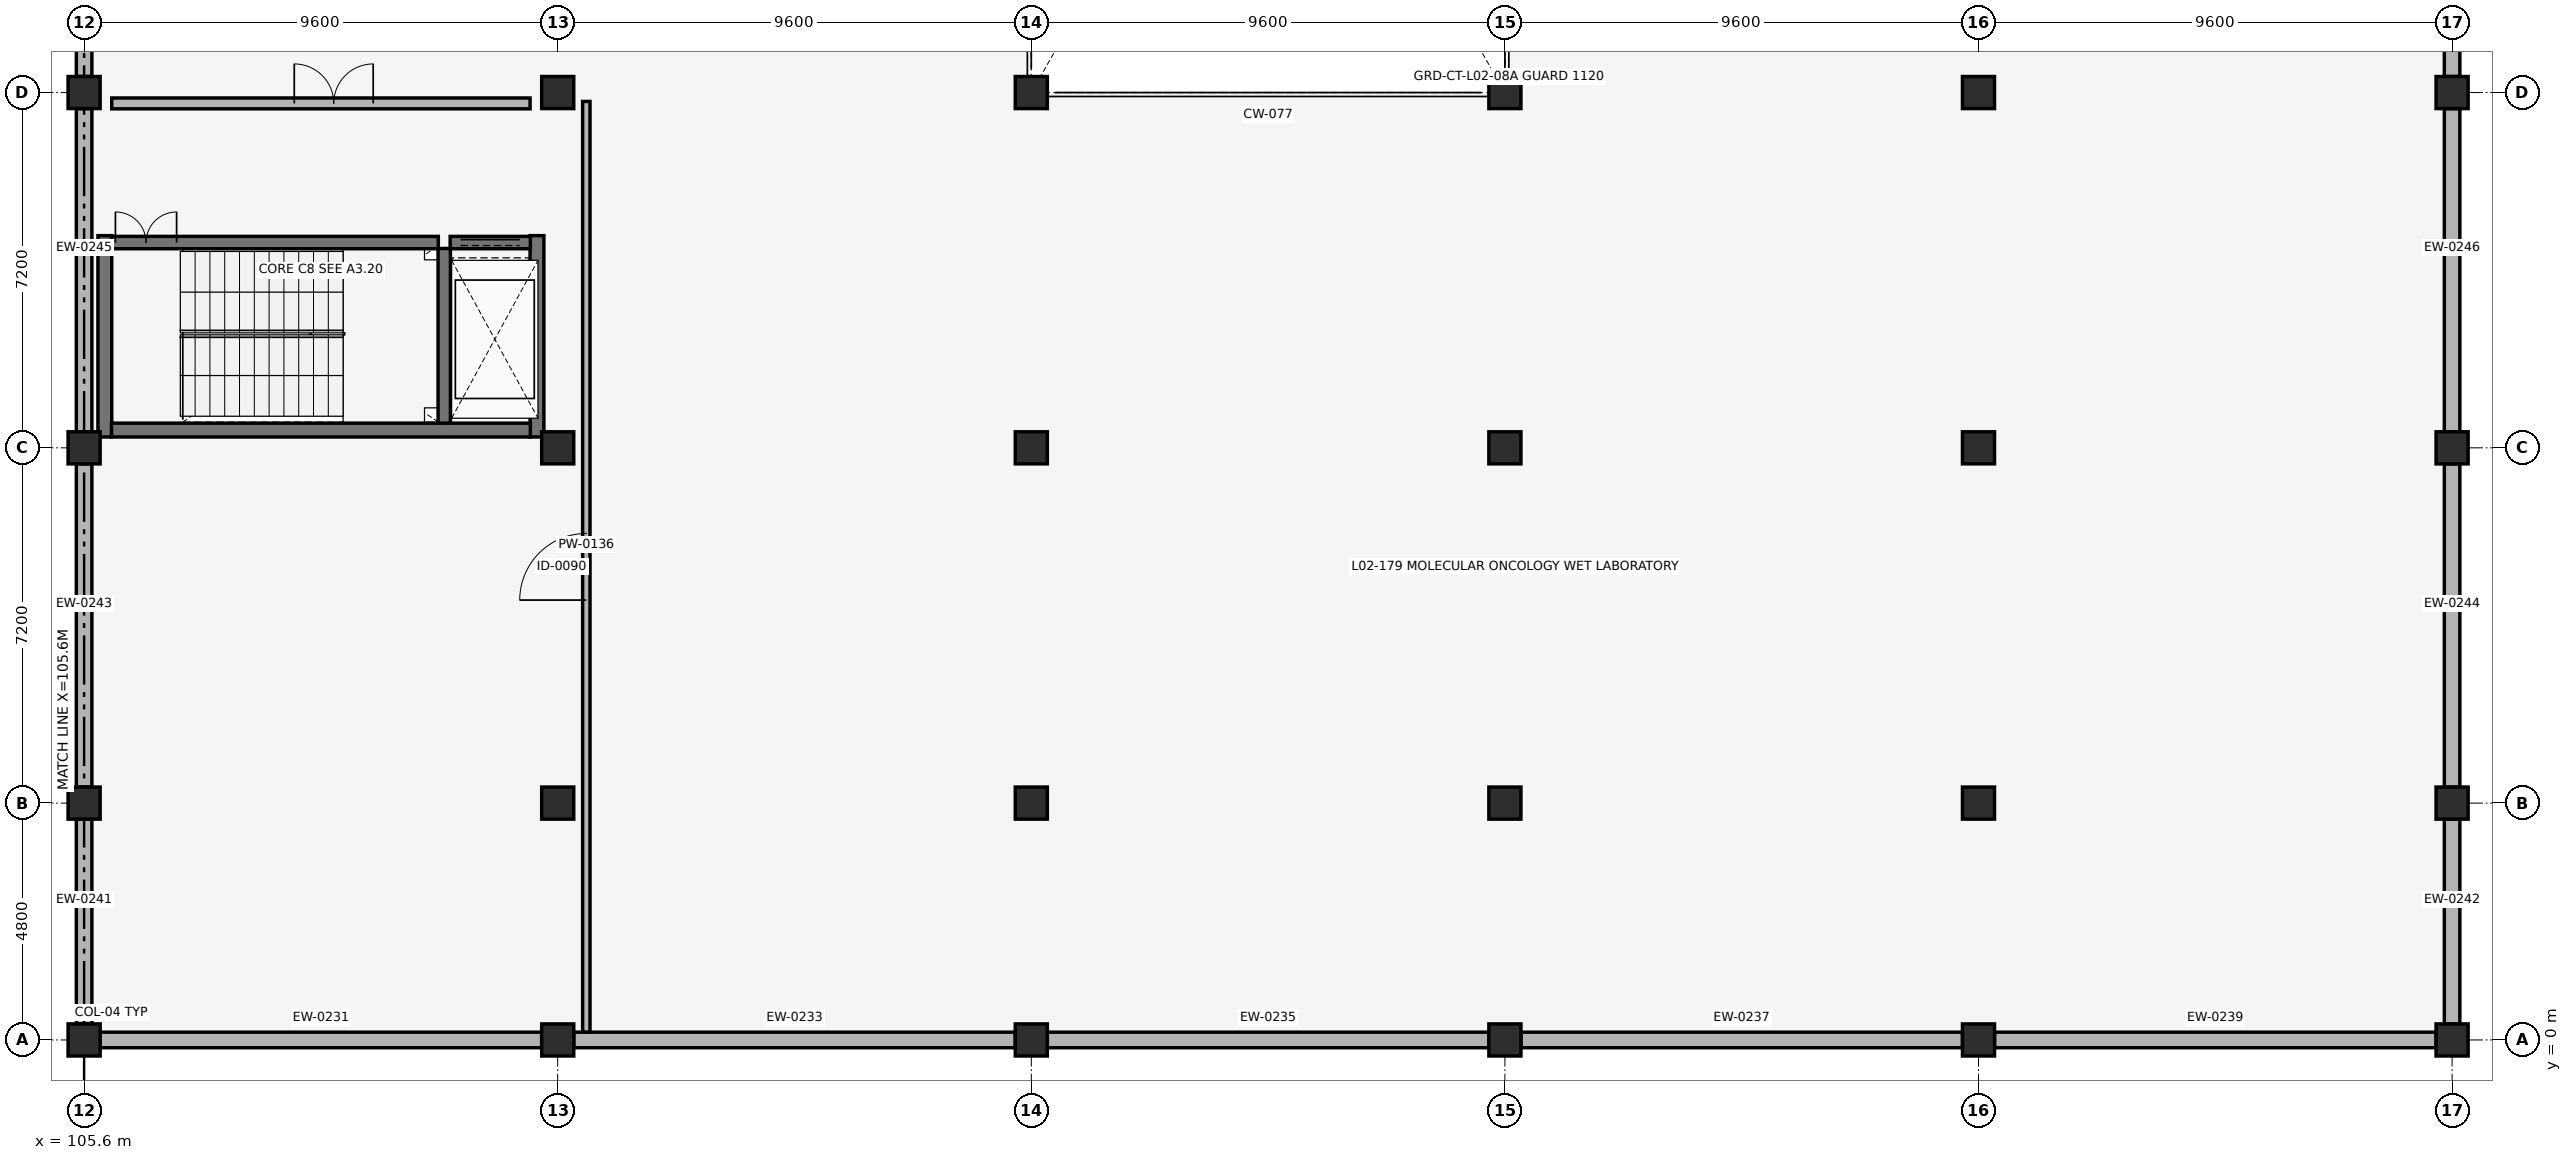
"""IFC4 building model, lengths in metres.
Left out: names, types, materials, properties, quantities, classifications, styles, units other than length and angle.
Written with IfcOpenShell. Run it as: python <this file> out.ifc"""

import sys

from ifc_helpers import new_model, si_unit, direction, frame, frame_2d, origin, origin_2d, place, context, subcontext, project, spatial, rectangle, extrude, element, fill, save


model = new_model("IFC4")
c1 = context("Model", 3, precision=1e-05, world=origin(), true_north=direction((0.0, 1.0)))
c2 = subcontext(c1, "Body", "Model", "MODEL_VIEW")
j1 = project(units=[si_unit("LENGTHUNIT", "METRE"), si_unit("PLANEANGLEUNIT", "RADIAN")], contexts=[c1])
p1 = place(None, origin())
s1 = spatial("IfcSite", under=j1, at=p1, CompositionType="ELEMENT")
p2 = place(p1, origin())
s2 = spatial("IfcBuilding", under=s1, at=p2, CompositionType="ELEMENT")
p3 = place(p2, frame((0.0, 0.0, 8.5)))
s3 = spatial("IfcBuildingStorey", under=s2, at=p3, CompositionType="ELEMENT", Elevation=8.5)
for number, where, z_axis, x_axis in (
    (1, (105.6, 0.0, 0.0), (0.0, 0.0, 1.0), (1.0, 0.0, 0.0)),
    (2, (105.6, 4.8, 0.0), (0.0, 0.0, 1.0), (1.0, 0.0, 0.0)),
    (3, (105.6, 12.0, 0.0), (0.0, 0.0, 1.0), (1.0, 0.0, 0.0)),
    (4, (105.6, 19.2, 0.0), (0.0, 0.0, 1.0), (1.0, 0.0, 0.0)),
    (5, (115.2, 0.0, 0.0), (0.0, 0.0, 1.0), (1.0, 0.0, 0.0)),
    (6, (115.2, 4.8, 0.0), (0.0, 0.0, 1.0), (1.0, 0.0, 0.0)),
    (7, (115.2, 12.0, 0.0), (0.0, 0.0, 1.0), (1.0, 0.0, 0.0)),
    (8, (115.2, 19.2, 0.0), (0.0, 0.0, 1.0), (1.0, 0.0, 0.0)),
    (9, (124.8, 0.0, 0.0), (0.0, 0.0, 1.0), (1.0, 0.0, 0.0)),
    (10, (124.8, 4.8, 0.0), (0.0, 0.0, 1.0), (1.0, 0.0, 0.0)),
    (11, (124.8, 12.0, 0.0), (0.0, 0.0, 1.0), (1.0, 0.0, 0.0)),
    (12, (124.8, 19.2, 0.0), (0.0, 0.0, 1.0), (1.0, 0.0, 0.0)),
    (13, (134.4, 0.0, 0.0), (0.0, 0.0, 1.0), (1.0, 0.0, 0.0)),
    (14, (134.4, 4.8, 0.0), (0.0, 0.0, 1.0), (1.0, 0.0, 0.0)),
    (15, (134.4, 12.0, 0.0), (0.0, 0.0, 1.0), (1.0, 0.0, 0.0)),
    (16, (134.4, 19.2, 0.0), (0.0, 0.0, 1.0), (1.0, 0.0, 0.0)),
    (17, (144.0, 0.0, 0.0), (0.0, 0.0, 1.0), (1.0, 0.0, 0.0)),
    (18, (144.0, 4.8, 0.0), (0.0, 0.0, 1.0), (1.0, 0.0, 0.0)),
    (19, (144.0, 12.0, 0.0), (0.0, 0.0, 1.0), (1.0, 0.0, 0.0)),
    (20, (144.0, 19.2, 0.0), (0.0, 0.0, 1.0), (1.0, 0.0, 0.0)),
    (21, (153.6, 0.0, 0.0), (0.0, 0.0, 1.0), (1.0, 0.0, 0.0)),
    (22, (153.6, 4.8, 0.0), (0.0, 0.0, 1.0), (1.0, 0.0, 0.0)),
    (23, (153.6, 12.0, 0.0), (0.0, 0.0, 1.0), (1.0, 0.0, 0.0)),
    (24, (153.6, 19.2, 0.0), (0.0, 0.0, 1.0), (1.0, 0.0, 0.0)),
):
    element("IfcColumn", number, at=place(p3, frame(where, z_axis=z_axis, x_axis=x_axis)), inside=s3, PredefinedType="COLUMN", context=c2, shape_type="SweptSolid", body=[
        extrude(rectangle(XDim=0.65, YDim=0.65, at=origin_2d()), origin(), (0.0, 0.0, 1.0), 4.08),
    ])
p4 = place(p3, frame((105.925, 0.0, 0.0), z_axis=(0.0, 0.0, 1.0), x_axis=(1.0, 0.0, 0.0)))
e25 = element("IfcWall", 25, at=p4, inside=s3, PredefinedType="SOLIDWALL", context=c2, shape_type="SweptSolid", body=[
    extrude(rectangle(XDim=8.95, YDim=0.315, at=frame_2d((4.475, 0.0))), origin(), (0.0, 0.0, 1.0), 3.06),
])
p5 = place(p3, frame((115.525, 0.0, 0.0), z_axis=(0.0, 0.0, 1.0), x_axis=(1.0, 0.0, 0.0)))
e26 = element("IfcWall", 26, at=p5, inside=s3, PredefinedType="SOLIDWALL", context=c2, shape_type="SweptSolid", body=[
    extrude(rectangle(XDim=8.95, YDim=0.315, at=frame_2d((4.475, 0.0))), origin(), (0.0, 0.0, 1.0), 3.06),
])
for number, where, z_axis, x_axis in (
    (27, (125.125, 0.0, 0.0), (0.0, 0.0, 1.0), (1.0, 0.0, 0.0)),
    (28, (134.725, 0.0, 0.0), (0.0, 0.0, 1.0), (1.0, 0.0, 0.0)),
    (29, (144.325, 0.0, 0.0), (0.0, 0.0, 1.0), (1.0, 0.0, 0.0)),
):
    element("IfcWall", number, at=place(p3, frame(where, z_axis=z_axis, x_axis=x_axis)), inside=s3, PredefinedType="SOLIDWALL", context=c2, shape_type="SweptSolid", body=[
        extrude(rectangle(XDim=8.95, YDim=0.315, at=frame_2d((4.475, 0.0))), origin(), (0.0, 0.0, 1.0), 3.06),
    ])
for number, where, z_axis, x_axis in (
    (30, (105.6, 4.475, 0.0), (0.0, 0.0, 1.0), (0.0, -1.0, 0.0)),
    (31, (153.6, 0.325, 0.0), (0.0, 0.0, 1.0), (0.0, 1.0, 0.0)),
):
    element("IfcWall", number, at=place(p3, frame(where, z_axis=z_axis, x_axis=x_axis)), inside=s3, PredefinedType="SOLIDWALL", context=c2, shape_type="SweptSolid", body=[
        extrude(rectangle(XDim=4.15, YDim=0.315, at=frame_2d((2.075, 0.0))), origin(), (0.0, 0.0, 1.0), 3.06),
    ])
for number, where, z_axis, x_axis in (
    (32, (105.6, 11.675, 0.0), (0.0, 0.0, 1.0), (0.0, -1.0, 0.0)),
    (33, (153.6, 5.125, 0.0), (0.0, 0.0, 1.0), (0.0, 1.0, 0.0)),
    (34, (105.6, 18.875, 0.0), (0.0, 0.0, 1.0), (0.0, -1.0, 0.0)),
    (35, (153.6, 12.325, 0.0), (0.0, 0.0, 1.0), (0.0, 1.0, 0.0)),
    (36, (105.6, 26.075, 0.0), (0.0, 0.0, 1.0), (0.0, -1.0, 0.0)),
    (37, (153.6, 19.525, 0.0), (0.0, 0.0, 1.0), (0.0, 1.0, 0.0)),
):
    element("IfcWall", number, at=place(p3, frame(where, z_axis=z_axis, x_axis=x_axis)), inside=s3, PredefinedType="SOLIDWALL", context=c2, shape_type="SweptSolid", body=[
        extrude(rectangle(XDim=6.55, YDim=0.315, at=frame_2d((3.275, 0.0))), origin(), (0.0, 0.0, 1.0), 3.06),
    ])
for number, where, z_axis, x_axis in (
    (38, (106.02, 12.22, 0.0), (0.0, 0.0, 1.0), (0.0, 1.0, 0.0)),
    (39, (114.78, 12.22, 0.0), (0.0, 0.0, 1.0), (0.0, 1.0, 0.0)),
):
    element("IfcWall", number, at=place(p3, frame(where, z_axis=z_axis, x_axis=x_axis)), inside=s3, PredefinedType="SHEAR", context=c2, shape_type="SweptSolid", body=[
        extrude(rectangle(XDim=4.08, YDim=0.28, at=frame_2d((2.04, 0.0))), origin(), (0.0, 0.0, 1.0), 3.78),
    ])
p6 = place(p3, frame((106.155, 12.36, 0.0), z_axis=(0.0, 0.0, 1.0), x_axis=(1.0, 0.0, 0.0)))
e40 = element("IfcWall", 40, at=p6, inside=s3, PredefinedType="SHEAR", context=c2, shape_type="SweptSolid", body=[
    extrude(rectangle(XDim=8.49, YDim=0.28, at=frame_2d((4.245, 0.0))), origin(), (0.0, 0.0, 1.0), 3.78),
])
p7 = place(p3, frame((112.9, 12.5, 0.0), z_axis=(0.0, 0.0, 1.0), x_axis=(0.0, 1.0, 0.0)))
e41 = element("IfcWall", 41, at=p7, inside=s3, PredefinedType="SHEAR", context=c2, shape_type="SweptSolid", body=[
    extrude(rectangle(XDim=3.54, YDim=0.25, at=frame_2d((1.77, 0.0))), origin(), (0.0, 0.0, 1.0), 3.78),
])
p8 = place(p3, frame((106.155, 16.16, 0.0), z_axis=(0.0, 0.0, 1.0), x_axis=(1.0, 0.0, 0.0)))
e42 = element("IfcWall", 42, at=p8, inside=s3, PredefinedType="SHEAR", context=c2, shape_type="SweptSolid", body=[
    extrude(rectangle(XDim=6.625, YDim=0.25, at=frame_2d((3.312, 0.0))), origin(), (0.0, 0.0, 1.0), 3.78),
])
p9 = place(p8, frame((0.08, 0.0, 0.0)))
e43 = element("IfcOpeningElement", 43, at=p9, cuts=e42, PredefinedType="OPENING", context=c2, shape_type="SweptSolid", body=[
    extrude(rectangle(XDim=1.24, YDim=2.15, at=frame_2d((0.62, 1.075))), frame((0.0, 0.135, 0.0), z_axis=(0.0, -1.0, 0.0), x_axis=(1.0, 0.0, 0.0)), (0.0, 0.0, 1.0), 0.27),
])
p10 = place(p3, frame((106.16, 18.98, 0.0), z_axis=(0.0, 0.0, 1.0), x_axis=(1.0, 0.0, 0.0)))
e44 = element("IfcWall", 44, at=p10, inside=s3, PredefinedType="PARTITIONING", context=c2, shape_type="SweptSolid", body=[
    extrude(rectangle(XDim=8.48, YDim=0.22, at=frame_2d((4.24, 0.0))), origin(), (0.0, 0.0, 1.0), 3.06),
])
p11 = place(p10, frame((3.7, 0.0, 0.0)))
e45 = element("IfcOpeningElement", 45, at=p11, cuts=e44, PredefinedType="OPENING", context=c2, shape_type="SweptSolid", body=[
    extrude(rectangle(XDim=1.6, YDim=2.2, at=frame_2d((0.8, 1.1))), frame((0.0, 0.12, 0.0), z_axis=(0.0, -1.0, 0.0), x_axis=(1.0, 0.0, 0.0)), (0.0, 0.0, 1.0), 0.24),
])
p12 = place(p3, frame((113.02, 16.16, 0.0), z_axis=(0.0, 0.0, 1.0), x_axis=(1.0, 0.0, 0.0)))
e46 = element("IfcWall", 46, at=p12, inside=s3, PredefinedType="SHEAR", context=c2, shape_type="SweptSolid", body=[
    extrude(rectangle(XDim=1.625, YDim=0.25, at=frame_2d((0.812, 0.0))), origin(), (0.0, 0.0, 1.0), 3.78),
])
p13 = place(p12, frame((0.212, 0.0, 0.0)))
e47 = element("IfcOpeningElement", 47, at=p13, cuts=e46, PredefinedType="OPENING", context=c2, shape_type="SweptSolid", body=[
    extrude(rectangle(XDim=1.2, YDim=2.15, at=frame_2d((0.6, 1.075))), frame((0.0, 0.135, 0.0), z_axis=(0.0, -1.0, 0.0), x_axis=(1.0, 0.0, 0.0)), (0.0, 0.0, 1.0), 0.27),
])
p14 = place(p3, frame((115.78, 0.159, 0.0), z_axis=(0.0, 0.0, 1.0), x_axis=(0.0, 1.0, 0.0)))
e48 = element("IfcWall", 48, at=p14, inside=s3, PredefinedType="PARTITIONING", context=c2, shape_type="SweptSolid", body=[
    extrude(rectangle(XDim=18.861, YDim=0.15, at=frame_2d((9.43, 0.0))), origin(), (0.0, 0.0, 1.0), 3.06),
])
p15 = place(p14, frame((8.755, 0.0, 0.0)))
e49 = element("IfcOpeningElement", 49, at=p15, cuts=e48, PredefinedType="OPENING", context=c2, shape_type="SweptSolid", body=[
    extrude(rectangle(XDim=1.35, YDim=2.12, at=frame_2d((0.675, 1.06))), frame((0.0, 0.085, 0.0), z_axis=(0.0, -1.0, 0.0), x_axis=(1.0, 0.0, 0.0)), (0.0, 0.0, 1.0), 0.17),
])
p16 = place(p9, origin())
e50 = element("IfcDoor", 50, at=p16, inside=s3, OperationType="DOUBLE_DOOR_SINGLE_SWING", PredefinedType="DOOR", context=c2, shape_type="SweptSolid", body=[
    extrude(rectangle(XDim=1.24, YDim=2.15, at=frame_2d((0.62, 1.075))), frame((0.0, 0.025, 0.0), z_axis=(0.0, -1.0, 0.0), x_axis=(1.0, 0.0, 0.0)), (0.0, 0.0, 1.0), 0.05),
])
fill(e43, e50)
p17 = place(p11, origin())
e51 = element("IfcDoor", 51, at=p17, inside=s3, OperationType="DOUBLE_DOOR_SINGLE_SWING", PredefinedType="DOOR", context=c2, shape_type="SweptSolid", body=[
    extrude(rectangle(XDim=1.6, YDim=2.2, at=frame_2d((0.8, 1.1))), frame((0.0, 0.025, 0.0), z_axis=(0.0, -1.0, 0.0), x_axis=(1.0, 0.0, 0.0)), (0.0, 0.0, 1.0), 0.05),
])
fill(e45, e51)
p18 = place(p13, origin())
e52 = element("IfcDoor", 52, at=p18, inside=s3, OperationType="DOUBLE_DOOR_SLIDING", PredefinedType="DOOR", context=c2, shape_type="SweptSolid", body=[
    extrude(rectangle(XDim=1.2, YDim=2.15, at=frame_2d((0.6, 1.075))), frame((0.0, 0.025, 0.0), z_axis=(0.0, -1.0, 0.0), x_axis=(1.0, 0.0, 0.0)), (0.0, 0.0, 1.0), 0.05),
])
fill(e47, e52)
p19 = place(p15, origin())
e53 = element("IfcDoor", 53, at=p19, inside=s3, OperationType="SINGLE_SWING_LEFT", PredefinedType="DOOR", context=c2, shape_type="SweptSolid", body=[
    extrude(rectangle(XDim=1.35, YDim=2.12, at=frame_2d((0.675, 1.06))), frame((0.0, 0.025, 0.0), z_axis=(0.0, -1.0, 0.0), x_axis=(1.0, 0.0, 0.0)), (0.0, 0.0, 1.0), 0.05),
])
fill(e49, e53)
save(model, sys.argv[1])
